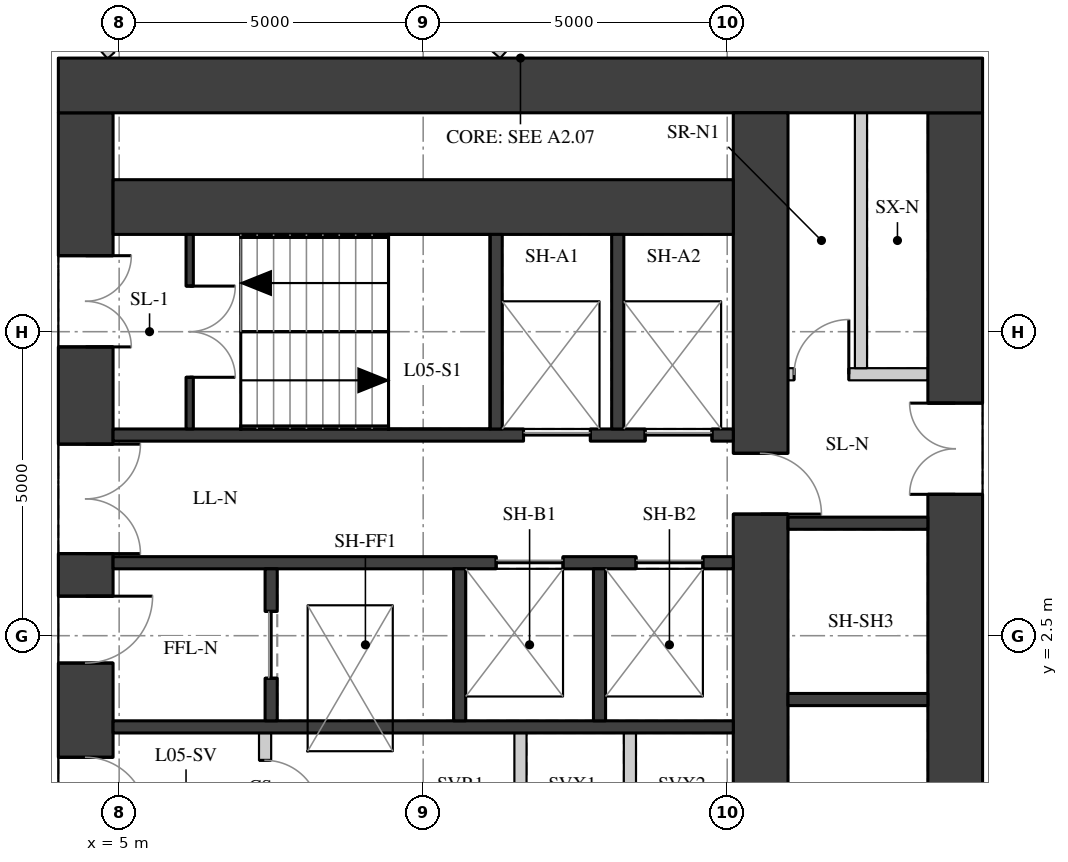
"""IFC4 building model, lengths in metres.
Left out: names, types, materials, properties, quantities, classifications, styles, units other than length and angle.
Written with IfcOpenShell. Run it as: python <this file> out.ifc"""

import sys

from ifc_helpers import new_model, si_unit, direction, frame, frame_2d, origin, place, context, subcontext, project, spatial, rectangle, extrude, element, fill, save


model = new_model("IFC4")
c1 = context("Model", 3, precision=1e-05, world=origin(), true_north=direction((0.0, 1.0)))
c2 = subcontext(c1, "Body", "Model", "MODEL_VIEW")
j1 = project(units=[si_unit("LENGTHUNIT", "METRE"), si_unit("PLANEANGLEUNIT", "RADIAN")], contexts=[c1])
p1 = place(None, origin())
s1 = spatial("IfcSite", under=j1, at=p1, CompositionType="ELEMENT")
p2 = place(p1, origin())
s2 = spatial("IfcBuilding", under=s1, at=p2, CompositionType="ELEMENT")
p3 = place(p2, frame((0.0, 0.0, 25.0)))
s3 = spatial("IfcBuildingStorey", under=s2, at=p3, CompositionType="ELEMENT", Elevation=25.0)
p4 = place(p3, frame((4.45, -11.1, 0.0), z_axis=(0.0, 0.0, 1.0), x_axis=(0.0, 1.0, 0.0)))
e1 = element("IfcWall", 1, at=p4, inside=s3, PredefinedType="SHEAR", context=c2, shape_type="SweptSolid", body=[
    extrude(rectangle(XDim=22.2, YDim=0.9, at=frame_2d((11.1, 0.0))), origin(), (0.0, 0.0, 1.0), 3.02),
])
p5 = place(p4, frame((2.35, 0.0, 0.0)))
e2 = element("IfcOpeningElement", 2, at=p5, cuts=e1, PredefinedType="OPENING", context=c2, shape_type="SweptSolid", body=[
    extrude(rectangle(XDim=1.5, YDim=2.1, at=frame_2d((0.75, 1.05))), frame((0.0, 0.46, 0.0), z_axis=(0.0, -1.0, 0.0), x_axis=(1.0, 0.0, 0.0)), (0.0, 0.0, 1.0), 0.92),
])
p6 = place(p4, frame((5.45, 0.0, 0.0)))
e3 = element("IfcOpeningElement", 3, at=p6, cuts=e1, PredefinedType="OPENING", context=c2, shape_type="SweptSolid", body=[
    extrude(rectangle(XDim=1.8, YDim=2.1, at=frame_2d((0.9, 1.05))), frame((0.0, 0.46, 0.0), z_axis=(0.0, -1.0, 0.0), x_axis=(1.0, 0.0, 0.0)), (0.0, 0.0, 1.0), 0.92),
])
p7 = place(p4, frame((7.95, 0.0, 0.0)))
e4 = element("IfcOpeningElement", 4, at=p7, cuts=e1, PredefinedType="OPENING", context=c2, shape_type="SweptSolid", body=[
    extrude(rectangle(XDim=1.1, YDim=2.1, at=frame_2d((0.55, 1.05))), frame((0.0, 0.46, 0.0), z_axis=(0.0, -1.0, 0.0), x_axis=(1.0, 0.0, 0.0)), (0.0, 0.0, 1.0), 0.92),
])
p8 = place(p4, frame((10.6, 0.0, 0.0)))
e5 = element("IfcOpeningElement", 5, at=p8, cuts=e1, PredefinedType="OPENING", context=c2, shape_type="SweptSolid", body=[
    extrude(rectangle(XDim=1.0, YDim=2.1, at=frame_2d((0.5, 1.05))), frame((0.0, 0.46, 0.0), z_axis=(0.0, -1.0, 0.0), x_axis=(1.0, 0.0, 0.0)), (0.0, 0.0, 1.0), 0.92),
])
p9 = place(p4, frame((13.15, 0.0, 0.0)))
e6 = element("IfcOpeningElement", 6, at=p9, cuts=e1, PredefinedType="OPENING", context=c2, shape_type="SweptSolid", body=[
    extrude(rectangle(XDim=1.1, YDim=2.1, at=frame_2d((0.55, 1.05))), frame((0.0, 0.46, 0.0), z_axis=(0.0, -1.0, 0.0), x_axis=(1.0, 0.0, 0.0)), (0.0, 0.0, 1.0), 0.92),
])
p10 = place(p4, frame((14.95, 0.0, 0.0)))
e7 = element("IfcOpeningElement", 7, at=p10, cuts=e1, PredefinedType="OPENING", context=c2, shape_type="SweptSolid", body=[
    extrude(rectangle(XDim=1.8, YDim=2.1, at=frame_2d((0.9, 1.05))), frame((0.0, 0.46, 0.0), z_axis=(0.0, -1.0, 0.0), x_axis=(1.0, 0.0, 0.0)), (0.0, 0.0, 1.0), 0.92),
])
p11 = place(p4, frame((18.35, 0.0, 0.0)))
e8 = element("IfcOpeningElement", 8, at=p11, cuts=e1, PredefinedType="OPENING", context=c2, shape_type="SweptSolid", body=[
    extrude(rectangle(XDim=1.5, YDim=2.1, at=frame_2d((0.75, 1.05))), frame((0.0, 0.46, 0.0), z_axis=(0.0, -1.0, 0.0), x_axis=(1.0, 0.0, 0.0)), (0.0, 0.0, 1.0), 0.92),
])
p12 = place(p3, frame((18.75, -11.1, 0.0), z_axis=(0.0, 0.0, 1.0), x_axis=(0.0, 1.0, 0.0)))
e9 = element("IfcWall", 9, at=p12, inside=s3, PredefinedType="SHEAR", context=c2, shape_type="SweptSolid", body=[
    extrude(rectangle(XDim=22.2, YDim=0.9, at=frame_2d((11.1, 0.0))), origin(), (0.0, 0.0, 1.0), 3.02),
])
p13 = place(p12, frame((15.925, 0.0, 0.0)))
e10 = element("IfcOpeningElement", 10, at=p13, cuts=e9, PredefinedType="OPENING", context=c2, shape_type="SweptSolid", body=[
    extrude(rectangle(XDim=1.5, YDim=2.1, at=frame_2d((0.75, 1.05))), frame((0.0, 0.46, 0.0), z_axis=(0.0, -1.0, 0.0), x_axis=(1.0, 0.0, 0.0)), (0.0, 0.0, 1.0), 0.92),
])
p14 = place(p12, frame((4.525, 0.0, 0.0)))
e11 = element("IfcOpeningElement", 11, at=p14, cuts=e9, PredefinedType="OPENING", context=c2, shape_type="SweptSolid", body=[
    extrude(rectangle(XDim=1.5, YDim=2.1, at=frame_2d((0.75, 1.05))), frame((0.0, 0.46, 0.0), z_axis=(0.0, -1.0, 0.0), x_axis=(1.0, 0.0, 0.0)), (0.0, 0.0, 1.0), 0.92),
])
p15 = place(p3, frame((4.0, 11.55, 0.0), z_axis=(0.0, 0.0, 1.0), x_axis=(1.0, 0.0, 0.0)))
e12 = element("IfcWall", 12, at=p15, inside=s3, PredefinedType="SHEAR", context=c2, shape_type="SweptSolid", body=[
    extrude(rectangle(XDim=15.2, YDim=0.9, at=frame_2d((7.6, 0.0))), origin(), (0.0, 0.0, 1.0), 3.02),
])
p16 = place(p3, frame((15.55, -11.1, 0.0), z_axis=(0.0, 0.0, 1.0), x_axis=(0.0, 1.0, 0.0)))
e13 = element("IfcWall", 13, at=p16, inside=s3, PredefinedType="SHEAR", context=c2, shape_type="SweptSolid", body=[
    extrude(rectangle(XDim=22.2, YDim=0.9, at=frame_2d((11.1, 0.0))), origin(), (0.0, 0.0, 1.0), 3.02),
])
p17 = place(p16, frame((15.6, 0.0, 0.0)))
e14 = element("IfcOpeningElement", 14, at=p17, cuts=e13, PredefinedType="OPENING", context=c2, shape_type="SweptSolid", body=[
    extrude(rectangle(XDim=1.0, YDim=2.1, at=frame_2d((0.5, 1.05))), frame((0.0, 0.46, 0.0), z_axis=(0.0, -1.0, 0.0), x_axis=(1.0, 0.0, 0.0)), (0.0, 0.0, 1.0), 0.92),
])
p18 = place(p16, frame((5.6, 0.0, 0.0)))
e15 = element("IfcOpeningElement", 15, at=p18, cuts=e13, PredefinedType="OPENING", context=c2, shape_type="SweptSolid", body=[
    extrude(rectangle(XDim=1.0, YDim=2.1, at=frame_2d((0.5, 1.05))), frame((0.0, 0.46, 0.0), z_axis=(0.0, -1.0, 0.0), x_axis=(1.0, 0.0, 0.0)), (0.0, 0.0, 1.0), 0.92),
])
p19 = place(p3, frame((4.9, 9.55, 0.0), z_axis=(0.0, 0.0, 1.0), x_axis=(1.0, 0.0, 0.0)))
e16 = element("IfcWall", 16, at=p19, inside=s3, PredefinedType="SHEAR", context=c2, shape_type="SweptSolid", body=[
    extrude(rectangle(XDim=10.2, YDim=0.9, at=frame_2d((5.1, 0.0))), origin(), (0.0, 0.0, 1.0), 3.02),
])
p20 = place(p3, frame((4.9, 5.8, 0.0), z_axis=(0.0, 0.0, 1.0), x_axis=(1.0, 0.0, 0.0)))
e17 = element("IfcWall", 17, at=p20, inside=s3, PredefinedType="SHEAR", context=c2, shape_type="SweptSolid", body=[
    extrude(rectangle(XDim=10.2, YDim=0.2, at=frame_2d((5.1, 0.0))), origin(), (0.0, 0.0, 1.0), 3.02),
])
p21 = place(p20, frame((6.75, 0.0, 0.0)))
e18 = element("IfcOpeningElement", 18, at=p21, cuts=e17, PredefinedType="OPENING", context=c2, shape_type="SweptSolid", body=[
    extrude(rectangle(XDim=1.1, YDim=2.1, at=frame_2d((0.55, 1.05))), frame((0.0, 0.11, 0.0), z_axis=(0.0, -1.0, 0.0), x_axis=(1.0, 0.0, 0.0)), (0.0, 0.0, 1.0), 0.22),
])
p22 = place(p20, frame((8.75, 0.0, 0.0)))
e19 = element("IfcOpeningElement", 19, at=p22, cuts=e17, PredefinedType="OPENING", context=c2, shape_type="SweptSolid", body=[
    extrude(rectangle(XDim=1.1, YDim=2.1, at=frame_2d((0.55, 1.05))), frame((0.0, 0.11, 0.0), z_axis=(0.0, -1.0, 0.0), x_axis=(1.0, 0.0, 0.0)), (0.0, 0.0, 1.0), 0.22),
])
p23 = place(p3, frame((4.9, 3.7, 0.0), z_axis=(0.0, 0.0, 1.0), x_axis=(1.0, 0.0, 0.0)))
e20 = element("IfcWall", 20, at=p23, inside=s3, PredefinedType="SHEAR", context=c2, shape_type="SweptSolid", body=[
    extrude(rectangle(XDim=10.2, YDim=0.2, at=frame_2d((5.1, 0.0))), origin(), (0.0, 0.0, 1.0), 3.02),
])
p24 = place(p23, frame((6.3, 0.0, 0.0)))
e21 = element("IfcOpeningElement", 21, at=p24, cuts=e20, PredefinedType="OPENING", context=c2, shape_type="SweptSolid", body=[
    extrude(rectangle(XDim=1.1, YDim=2.1, at=frame_2d((0.55, 1.05))), frame((0.0, 0.11, 0.0), z_axis=(0.0, -1.0, 0.0), x_axis=(1.0, 0.0, 0.0)), (0.0, 0.0, 1.0), 0.22),
])
p25 = place(p23, frame((8.6, 0.0, 0.0)))
e22 = element("IfcOpeningElement", 22, at=p25, cuts=e20, PredefinedType="OPENING", context=c2, shape_type="SweptSolid", body=[
    extrude(rectangle(XDim=1.1, YDim=2.1, at=frame_2d((0.55, 1.05))), frame((0.0, 0.11, 0.0), z_axis=(0.0, -1.0, 0.0), x_axis=(1.0, 0.0, 0.0)), (0.0, 0.0, 1.0), 0.22),
])
p26 = place(p3, frame((4.9, 1.0, 0.0), z_axis=(0.0, 0.0, 1.0), x_axis=(1.0, 0.0, 0.0)))
e23 = element("IfcWall", 23, at=p26, inside=s3, PredefinedType="SHEAR", context=c2, shape_type="SweptSolid", body=[
    extrude(rectangle(XDim=10.2, YDim=0.2, at=frame_2d((5.1, 0.0))), origin(), (0.0, 0.0, 1.0), 3.02),
])
for number, where, z_axis, x_axis in (
    (24, (11.2, 5.9, 0.0), (0.0, 0.0, 1.0), (0.0, 1.0, 0.0)),
    (25, (13.2, 5.9, 0.0), (0.0, 0.0, 1.0), (0.0, 1.0, 0.0)),
):
    element("IfcWall", number, at=place(p3, frame(where, z_axis=z_axis, x_axis=x_axis)), inside=s3, PredefinedType="SHEAR", context=c2, shape_type="SweptSolid", body=[
        extrude(rectangle(XDim=3.2, YDim=0.2, at=frame_2d((1.6, 0.0))), origin(), (0.0, 0.0, 1.0), 3.02),
    ])
p27 = place(p3, frame((7.5, 1.1, 0.0), z_axis=(0.0, 0.0, 1.0), x_axis=(0.0, 1.0, 0.0)))
e26 = element("IfcWall", 26, at=p27, inside=s3, PredefinedType="SHEAR", context=c2, shape_type="SweptSolid", body=[
    extrude(rectangle(XDim=2.5, YDim=0.2, at=frame_2d((1.25, 0.0))), origin(), (0.0, 0.0, 1.0), 3.02),
])
p28 = place(p27, frame((0.7, 0.0, 0.0)))
e27 = element("IfcOpeningElement", 27, at=p28, cuts=e26, PredefinedType="OPENING", context=c2, shape_type="SweptSolid", body=[
    extrude(rectangle(XDim=1.1, YDim=2.1, at=frame_2d((0.55, 1.05))), frame((0.0, 0.11, 0.0), z_axis=(0.0, -1.0, 0.0), x_axis=(1.0, 0.0, 0.0)), (0.0, 0.0, 1.0), 0.22),
])
for number, where, z_axis, x_axis in (
    (28, (10.6, 1.1, 0.0), (0.0, 0.0, 1.0), (0.0, 1.0, 0.0)),
    (29, (12.9, 1.1, 0.0), (0.0, 0.0, 1.0), (0.0, 1.0, 0.0)),
):
    element("IfcWall", number, at=place(p3, frame(where, z_axis=z_axis, x_axis=x_axis)), inside=s3, PredefinedType="SHEAR", context=c2, shape_type="SweptSolid", body=[
        extrude(rectangle(XDim=2.5, YDim=0.2, at=frame_2d((1.25, 0.0))), origin(), (0.0, 0.0, 1.0), 3.02),
    ])
p29 = place(p3, frame((6.16, 5.9, 0.0), z_axis=(0.0, 0.0, 1.0), x_axis=(0.0, 1.0, 0.0)))
e30 = element("IfcWall", 30, at=p29, inside=s3, PredefinedType="SHEAR", context=c2, shape_type="SweptSolid", body=[
    extrude(rectangle(XDim=3.2, YDim=0.12, at=frame_2d((1.6, 0.0))), origin(), (0.0, 0.0, 1.0), 3.02),
])
p30 = place(p29, frame((0.85, 0.0, 0.0)))
e31 = element("IfcOpeningElement", 31, at=p30, cuts=e30, PredefinedType="OPENING", context=c2, shape_type="SweptSolid", body=[
    extrude(rectangle(XDim=1.5, YDim=2.1, at=frame_2d((0.75, 1.05))), frame((0.0, 0.07, 0.0), z_axis=(0.0, -1.0, 0.0), x_axis=(1.0, 0.0, 0.0)), (0.0, 0.0, 1.0), 0.14),
])
p31 = place(p3, frame((7.4, -0.9, 0.0), z_axis=(0.0, 0.0, 1.0), x_axis=(0.0, 1.0, 0.0)))
e32 = element("IfcWall", 32, at=p31, inside=s3, PredefinedType="PARTITIONING", context=c2, shape_type="SweptSolid", body=[
    extrude(rectangle(XDim=1.8, YDim=0.2, at=frame_2d((0.9, 0.0))), origin(), (0.0, 0.0, 1.0), 3.02),
])
p32 = place(p31, frame((0.45, 0.0, 0.0)))
e33 = element("IfcOpeningElement", 33, at=p32, cuts=e32, PredefinedType="OPENING", context=c2, shape_type="SweptSolid", body=[
    extrude(rectangle(XDim=0.9, YDim=2.1, at=frame_2d((0.45, 1.05))), frame((0.0, 0.11, 0.0), z_axis=(0.0, -1.0, 0.0), x_axis=(1.0, 0.0, 0.0)), (0.0, 0.0, 1.0), 0.22),
])
for number, where, z_axis, x_axis in (
    (34, (11.6, -0.9, 0.0), (0.0, 0.0, 1.0), (0.0, 1.0, 0.0)),
    (35, (13.4, -0.9, 0.0), (0.0, 0.0, 1.0), (0.0, 1.0, 0.0)),
):
    element("IfcWall", number, at=place(p3, frame(where, z_axis=z_axis, x_axis=x_axis)), inside=s3, PredefinedType="PARTITIONING", context=c2, shape_type="SweptSolid", body=[
        extrude(rectangle(XDim=1.8, YDim=0.2, at=frame_2d((0.9, 0.0))), origin(), (0.0, 0.0, 1.0), 3.02),
    ])
for number, where, z_axis, x_axis in (
    (36, (16.0, 1.45, 0.0), (0.0, 0.0, 1.0), (1.0, 0.0, 0.0)),
    (37, (16.0, 4.35, 0.0), (0.0, 0.0, 1.0), (1.0, 0.0, 0.0)),
):
    element("IfcWall", number, at=place(p3, frame(where, z_axis=z_axis, x_axis=x_axis)), inside=s3, PredefinedType="SHEAR", context=c2, shape_type="SweptSolid", body=[
        extrude(rectangle(XDim=2.3, YDim=0.2, at=frame_2d((1.15, 0.0))), origin(), (0.0, 0.0, 1.0), 3.02),
    ])
p33 = place(p3, frame((16.0, 6.8, 0.0), z_axis=(0.0, 0.0, 1.0), x_axis=(1.0, 0.0, 0.0)))
e38 = element("IfcWall", 38, at=p33, inside=s3, PredefinedType="PARTITIONING", context=c2, shape_type="SweptSolid", body=[
    extrude(rectangle(XDim=2.3, YDim=0.2, at=frame_2d((1.15, 0.0))), origin(), (0.0, 0.0, 1.0), 3.02),
])
p34 = place(p33, frame((0.1, 0.0, 0.0)))
e39 = element("IfcOpeningElement", 39, at=p34, cuts=e38, PredefinedType="OPENING", context=c2, shape_type="SweptSolid", body=[
    extrude(rectangle(XDim=0.9, YDim=2.1, at=frame_2d((0.45, 1.05))), frame((0.0, 0.11, 0.0), z_axis=(0.0, -1.0, 0.0), x_axis=(1.0, 0.0, 0.0)), (0.0, 0.0, 1.0), 0.22),
])
p35 = place(p3, frame((17.2, 6.9, 0.0), z_axis=(0.0, 0.0, 1.0), x_axis=(0.0, 1.0, 0.0)))
e40 = element("IfcWall", 40, at=p35, inside=s3, PredefinedType="PARTITIONING", context=c2, shape_type="SweptSolid", body=[
    extrude(rectangle(XDim=4.2, YDim=0.2, at=frame_2d((2.1, 0.0))), origin(), (0.0, 0.0, 1.0), 3.02),
])
p36 = place(p3, frame((4.865, 12.042, 0.0), z_axis=(0.0, 0.0, 1.0), x_axis=(-0.660014599896, 0.751252772323, 0.0)))
e41 = element("IfcWall", 41, at=p36, inside=s3, PredefinedType="PARTITIONING", context=c2, shape_type="SweptSolid", body=[
    extrude(rectangle(XDim=0.835, YDim=0.15, at=frame_2d((0.417, 0.0))), origin(), (0.0, 0.0, 1.0), 2.57),
])
p37 = place(p3, frame((9.813, 13.39, 0.0), z_axis=(0.0, 0.0, 1.0), x_axis=(0.746772740714, -0.665079298825, 0.0)))
e42 = element("IfcWall", 42, at=p37, inside=s3, PredefinedType="PARTITIONING", context=c2, shape_type="SweptSolid", body=[
    extrude(rectangle(XDim=2.011, YDim=0.15, at=frame_2d((1.006, 0.0))), origin(), (0.0, 0.0, 1.0), 3.02),
])
p38 = place(p8, origin())
e43 = element("IfcDoor", 43, at=p38, inside=s3, OperationType="SINGLE_SWING_RIGHT", PredefinedType="DOOR", context=c2, shape_type="SweptSolid", body=[
    extrude(rectangle(XDim=1.0, YDim=2.1, at=frame_2d((0.5, 1.05))), frame((0.0, 0.025, 0.0), z_axis=(0.0, -1.0, 0.0), x_axis=(1.0, 0.0, 0.0)), (0.0, 0.0, 1.0), 0.05),
])
fill(e5, e43)
p39 = place(p9, origin())
e44 = element("IfcDoor", 44, at=p39, inside=s3, OperationType="SINGLE_SWING_LEFT", PredefinedType="DOOR", context=c2, shape_type="SweptSolid", body=[
    extrude(rectangle(XDim=1.1, YDim=2.1, at=frame_2d((0.55, 1.05))), frame((0.0, 0.025, 0.0), z_axis=(0.0, -1.0, 0.0), x_axis=(1.0, 0.0, 0.0)), (0.0, 0.0, 1.0), 0.05),
])
fill(e6, e44)
p40 = place(p10, origin())
e45 = element("IfcDoor", 45, at=p40, inside=s3, OperationType="DOUBLE_DOOR_SINGLE_SWING", PredefinedType="DOOR", context=c2, shape_type="SweptSolid", body=[
    extrude(rectangle(XDim=1.8, YDim=2.1, at=frame_2d((0.9, 1.05))), frame((0.0, 0.025, 0.0), z_axis=(0.0, -1.0, 0.0), x_axis=(1.0, 0.0, 0.0)), (0.0, 0.0, 1.0), 0.05),
])
fill(e7, e45)
p41 = place(p11, origin())
e46 = element("IfcDoor", 46, at=p41, inside=s3, OperationType="DOUBLE_DOOR_SINGLE_SWING", PredefinedType="DOOR", context=c2, shape_type="SweptSolid", body=[
    extrude(rectangle(XDim=1.5, YDim=2.1, at=frame_2d((0.75, 1.05))), frame((0.0, 0.025, 0.0), z_axis=(0.0, -1.0, 0.0), x_axis=(1.0, 0.0, 0.0)), (0.0, 0.0, 1.0), 0.05),
])
fill(e8, e46)
p42 = place(p13, origin())
e47 = element("IfcDoor", 47, at=p42, inside=s3, OperationType="DOUBLE_DOOR_SINGLE_SWING", PredefinedType="DOOR", context=c2, shape_type="SweptSolid", body=[
    extrude(rectangle(XDim=1.5, YDim=2.1, at=frame_2d((0.75, 1.05))), frame((0.0, 0.025, 0.0), z_axis=(0.0, -1.0, 0.0), x_axis=(1.0, 0.0, 0.0)), (0.0, 0.0, 1.0), 0.05),
])
fill(e10, e47)
p43 = place(p30, origin())
e48 = element("IfcDoor", 48, at=p43, inside=s3, OperationType="DOUBLE_DOOR_SINGLE_SWING", PredefinedType="DOOR", context=c2, shape_type="SweptSolid", body=[
    extrude(rectangle(XDim=1.5, YDim=2.1, at=frame_2d((0.75, 1.05))), frame((0.0, 0.025, 0.0), z_axis=(0.0, -1.0, 0.0), x_axis=(1.0, 0.0, 0.0)), (0.0, 0.0, 1.0), 0.05),
])
fill(e31, e48)
p44 = place(p21, origin())
e49 = element("IfcDoor", 49, at=p44, inside=s3, OperationType="DOUBLE_DOOR_SLIDING", PredefinedType="DOOR", context=c2, shape_type="SweptSolid", body=[
    extrude(rectangle(XDim=1.1, YDim=2.1, at=frame_2d((0.55, 1.05))), frame((0.0, 0.025, 0.0), z_axis=(0.0, -1.0, 0.0), x_axis=(1.0, 0.0, 0.0)), (0.0, 0.0, 1.0), 0.05),
])
fill(e18, e49)
p45 = place(p22, origin())
e50 = element("IfcDoor", 50, at=p45, inside=s3, OperationType="DOUBLE_DOOR_SLIDING", PredefinedType="DOOR", context=c2, shape_type="SweptSolid", body=[
    extrude(rectangle(XDim=1.1, YDim=2.1, at=frame_2d((0.55, 1.05))), frame((0.0, 0.025, 0.0), z_axis=(0.0, -1.0, 0.0), x_axis=(1.0, 0.0, 0.0)), (0.0, 0.0, 1.0), 0.05),
])
fill(e19, e50)
p46 = place(p24, origin())
e51 = element("IfcDoor", 51, at=p46, inside=s3, OperationType="DOUBLE_DOOR_SLIDING", PredefinedType="DOOR", context=c2, shape_type="SweptSolid", body=[
    extrude(rectangle(XDim=1.1, YDim=2.1, at=frame_2d((0.55, 1.05))), frame((0.0, 0.025, 0.0), z_axis=(0.0, -1.0, 0.0), x_axis=(1.0, 0.0, 0.0)), (0.0, 0.0, 1.0), 0.05),
])
fill(e21, e51)
p47 = place(p25, origin())
e52 = element("IfcDoor", 52, at=p47, inside=s3, OperationType="DOUBLE_DOOR_SLIDING", PredefinedType="DOOR", context=c2, shape_type="SweptSolid", body=[
    extrude(rectangle(XDim=1.1, YDim=2.1, at=frame_2d((0.55, 1.05))), frame((0.0, 0.025, 0.0), z_axis=(0.0, -1.0, 0.0), x_axis=(1.0, 0.0, 0.0)), (0.0, 0.0, 1.0), 0.05),
])
fill(e22, e52)
p48 = place(p28, origin())
e53 = element("IfcDoor", 53, at=p48, inside=s3, OperationType="DOUBLE_DOOR_SLIDING", PredefinedType="DOOR", context=c2, shape_type="SweptSolid", body=[
    extrude(rectangle(XDim=1.1, YDim=2.1, at=frame_2d((0.55, 1.05))), frame((0.0, 0.025, 0.0), z_axis=(0.0, -1.0, 0.0), x_axis=(1.0, 0.0, 0.0)), (0.0, 0.0, 1.0), 0.05),
])
fill(e27, e53)
p49 = place(p32, origin())
e54 = element("IfcDoor", 54, at=p49, inside=s3, OperationType="SINGLE_SWING_RIGHT", PredefinedType="DOOR", context=c2, shape_type="SweptSolid", body=[
    extrude(rectangle(XDim=0.9, YDim=2.1, at=frame_2d((0.45, 1.05))), frame((0.0, 0.025, 0.0), z_axis=(0.0, -1.0, 0.0), x_axis=(1.0, 0.0, 0.0)), (0.0, 0.0, 1.0), 0.05),
])
fill(e33, e54)
p50 = place(p17, origin())
e55 = element("IfcDoor", 55, at=p50, inside=s3, OperationType="SINGLE_SWING_RIGHT", PredefinedType="DOOR", context=c2, shape_type="SweptSolid", body=[
    extrude(rectangle(XDim=1.0, YDim=2.1, at=frame_2d((0.5, 1.05))), frame((0.0, 0.025, 0.0), z_axis=(0.0, -1.0, 0.0), x_axis=(1.0, 0.0, 0.0)), (0.0, 0.0, 1.0), 0.05),
])
fill(e14, e55)
p51 = place(p34, origin())
e56 = element("IfcDoor", 56, at=p51, inside=s3, OperationType="SINGLE_SWING_RIGHT", PredefinedType="DOOR", context=c2, shape_type="SweptSolid", body=[
    extrude(rectangle(XDim=0.9, YDim=2.1, at=frame_2d((0.45, 1.05))), frame((0.0, 0.025, 0.0), z_axis=(0.0, -1.0, 0.0), x_axis=(1.0, 0.0, 0.0)), (0.0, 0.0, 1.0), 0.05),
])
fill(e39, e56)
save(model, sys.argv[1])
